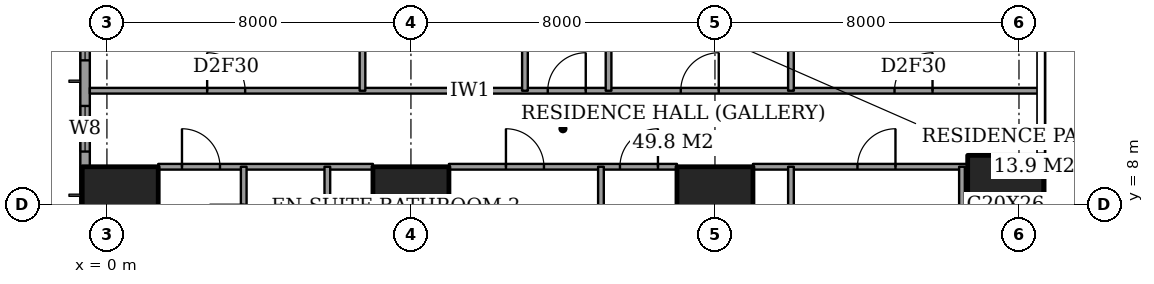
"""IFC4 building model, lengths in metres.
Left out: names, types, materials, properties, quantities, classifications, styles, units other than length and angle.
Written with IfcOpenShell. Run it as: python <this file> out.ifc"""

import sys

from ifc_helpers import new_model, si_unit, direction, frame, frame_2d, origin, origin_2d, place, context, subcontext, project, spatial, rectangle, extrude, element, fill, save


model = new_model("IFC4")
c1 = context("Model", 3, precision=1e-05, world=origin(), true_north=direction((0.0, 1.0)))
c2 = subcontext(c1, "Body", "Model", "MODEL_VIEW")
j1 = project(units=[si_unit("LENGTHUNIT", "METRE"), si_unit("PLANEANGLEUNIT", "RADIAN")], contexts=[c1])
p1 = place(None, origin())
s1 = spatial("IfcSite", under=j1, at=p1, CompositionType="ELEMENT")
p2 = place(p1, origin())
s2 = spatial("IfcBuilding", under=s1, at=p2, CompositionType="ELEMENT")
p3 = place(p2, frame((0.0, 0.0, 72.8)))
s3 = spatial("IfcBuildingStorey", under=s2, at=p3, CompositionType="ELEMENT", Elevation=72.8)
for number, where, z_axis, x_axis in (
    (1, (0.35, 8.0, 0.0), (0.0, 0.0, 1.0), (1.0, 0.0, 0.0)),
    (2, (8.0, 8.0, 0.0), (0.0, 0.0, 1.0), (1.0, 0.0, 0.0)),
    (3, (16.0, 8.0, 0.0), (0.0, 0.0, 1.0), (1.0, 0.0, 0.0)),
):
    element("IfcColumn", number, at=place(p3, frame(where, z_axis=z_axis, x_axis=x_axis)), inside=s3, PredefinedType="COLUMN", context=c2, shape_type="SweptSolid", body=[
        extrude(rectangle(XDim=2.0, YDim=2.0, at=origin_2d()), origin(), (0.0, 0.0, 1.0), 3.6),
    ])
p4 = place(p3, frame((23.65, 8.0, 0.0), z_axis=(0.0, 0.0, 1.0), x_axis=(1.0, 0.0, 0.0)))
e4 = element("IfcColumn", 4, at=p4, inside=s3, PredefinedType="COLUMN", context=c2, shape_type="SweptSolid", body=[
    extrude(rectangle(XDim=2.0, YDim=2.6, at=origin_2d()), origin(), (0.0, 0.0, 1.0), 3.6),
])
p5 = place(p3, frame((-0.575, 44.825, 0.0), z_axis=(0.0, 0.0, 1.0), x_axis=(0.0, -1.0, 0.0)))
e5 = element("IfcWall", 5, at=p5, inside=s3, PredefinedType="SOLIDWALL", context=c2, shape_type="SweptSolid", body=[
    extrude(rectangle(XDim=41.65, YDim=0.25, at=frame_2d((20.825, 0.0))), origin(), (0.0, 0.0, 1.0), 3.6),
])
p6 = place(p5, frame((0.775, 0.0, 0.6)))
e6 = element("IfcOpeningElement", 6, at=p6, cuts=e5, PredefinedType="OPENING", context=c2, shape_type="SweptSolid", body=[
    extrude(rectangle(XDim=2.4, YDim=2.0, at=frame_2d((1.2, 1.0))), frame((0.0, 0.135, 0.0), z_axis=(0.0, -1.0, 0.0), x_axis=(1.0, 0.0, 0.0)), (0.0, 0.0, 1.0), 0.27),
])
p7 = place(p5, frame((6.1, 0.0, 0.6)))
e7 = element("IfcOpeningElement", 7, at=p7, cuts=e5, PredefinedType="OPENING", context=c2, shape_type="SweptSolid", body=[
    extrude(rectangle(XDim=1.2, YDim=2.0, at=frame_2d((0.6, 1.0))), frame((0.0, 0.135, 0.0), z_axis=(0.0, -1.0, 0.0), x_axis=(1.0, 0.0, 0.0)), (0.0, 0.0, 1.0), 0.27),
])
p8 = place(p5, frame((8.425, 0.0, 0.6)))
e8 = element("IfcOpeningElement", 8, at=p8, cuts=e5, PredefinedType="OPENING", context=c2, shape_type="SweptSolid", body=[
    extrude(rectangle(XDim=2.4, YDim=2.0, at=frame_2d((1.2, 1.0))), frame((0.0, 0.135, 0.0), z_axis=(0.0, -1.0, 0.0), x_axis=(1.0, 0.0, 0.0)), (0.0, 0.0, 1.0), 0.27),
])
p9 = place(p5, frame((15.625, 0.0, 0.6)))
e9 = element("IfcOpeningElement", 9, at=p9, cuts=e5, PredefinedType="OPENING", context=c2, shape_type="SweptSolid", body=[
    extrude(rectangle(XDim=2.4, YDim=2.0, at=frame_2d((1.2, 1.0))), frame((0.0, 0.135, 0.0), z_axis=(0.0, -1.0, 0.0), x_axis=(1.0, 0.0, 0.0)), (0.0, 0.0, 1.0), 0.27),
])
p10 = place(p5, frame((23.625, 0.0, 0.6)))
e10 = element("IfcOpeningElement", 10, at=p10, cuts=e5, PredefinedType="OPENING", context=c2, shape_type="SweptSolid", body=[
    extrude(rectangle(XDim=2.4, YDim=2.0, at=frame_2d((1.2, 1.0))), frame((0.0, 0.135, 0.0), z_axis=(0.0, -1.0, 0.0), x_axis=(1.0, 0.0, 0.0)), (0.0, 0.0, 1.0), 0.27),
])
p11 = place(p5, frame((30.625, 0.0, 0.6)))
e11 = element("IfcOpeningElement", 11, at=p11, cuts=e5, PredefinedType="OPENING", context=c2, shape_type="SweptSolid", body=[
    extrude(rectangle(XDim=2.4, YDim=2.0, at=frame_2d((1.2, 1.0))), frame((0.0, 0.135, 0.0), z_axis=(0.0, -1.0, 0.0), x_axis=(1.0, 0.0, 0.0)), (0.0, 0.0, 1.0), 0.27),
])
p12 = place(p5, frame((34.225, 0.0, 0.6)))
e12 = element("IfcOpeningElement", 12, at=p12, cuts=e5, PredefinedType="OPENING", context=c2, shape_type="SweptSolid", body=[
    extrude(rectangle(XDim=1.2, YDim=2.0, at=frame_2d((0.6, 1.0))), frame((0.0, 0.135, 0.0), z_axis=(0.0, -1.0, 0.0), x_axis=(1.0, 0.0, 0.0)), (0.0, 0.0, 1.0), 0.27),
])
p13 = place(p5, frame((38.475, 0.0, 0.6)))
e13 = element("IfcOpeningElement", 13, at=p13, cuts=e5, PredefinedType="OPENING", context=c2, shape_type="SweptSolid", body=[
    extrude(rectangle(XDim=2.4, YDim=2.0, at=frame_2d((1.2, 1.0))), frame((0.0, 0.135, 0.0), z_axis=(0.0, -1.0, 0.0), x_axis=(1.0, 0.0, 0.0)), (0.0, 0.0, 1.0), 0.27),
])
p14 = place(p3, frame((1.35, 9.0, 0.0), z_axis=(0.0, 0.0, 1.0), x_axis=(1.0, 0.0, 0.0)))
e14 = element("IfcWall", 14, at=p14, inside=s3, PredefinedType="PARTITIONING", context=c2, shape_type="SweptSolid", body=[
    extrude(rectangle(XDim=5.65, YDim=0.15, at=frame_2d((2.825, 0.0))), origin(), (0.0, 0.0, 1.0), 3.35),
])
p15 = place(p14, frame((0.625, 0.0, 0.0)))
e15 = element("IfcOpeningElement", 15, at=p15, cuts=e14, PredefinedType="OPENING", context=c2, shape_type="SweptSolid", body=[
    extrude(rectangle(XDim=1.0, YDim=2.1, at=frame_2d((0.5, 1.05))), frame((0.0, 0.085, 0.0), z_axis=(0.0, -1.0, 0.0), x_axis=(1.0, 0.0, 0.0)), (0.0, 0.0, 1.0), 0.17),
])
p16 = place(p3, frame((9.0, 9.0, 0.0), z_axis=(0.0, 0.0, 1.0), x_axis=(1.0, 0.0, 0.0)))
e16 = element("IfcWall", 16, at=p16, inside=s3, PredefinedType="PARTITIONING", context=c2, shape_type="SweptSolid", body=[
    extrude(rectangle(XDim=6.0, YDim=0.15, at=frame_2d((3.0, 0.0))), origin(), (0.0, 0.0, 1.0), 3.35),
])
p17 = place(p16, frame((1.5, 0.0, 0.0)))
e17 = element("IfcOpeningElement", 17, at=p17, cuts=e16, PredefinedType="OPENING", context=c2, shape_type="SweptSolid", body=[
    extrude(rectangle(XDim=1.0, YDim=2.1, at=frame_2d((0.5, 1.05))), frame((0.0, 0.085, 0.0), z_axis=(0.0, -1.0, 0.0), x_axis=(1.0, 0.0, 0.0)), (0.0, 0.0, 1.0), 0.17),
])
p18 = place(p16, frame((4.5, 0.0, 0.0)))
e18 = element("IfcOpeningElement", 18, at=p18, cuts=e16, PredefinedType="OPENING", context=c2, shape_type="SweptSolid", body=[
    extrude(rectangle(XDim=1.0, YDim=2.1, at=frame_2d((0.5, 1.05))), frame((0.0, 0.085, 0.0), z_axis=(0.0, -1.0, 0.0), x_axis=(1.0, 0.0, 0.0)), (0.0, 0.0, 1.0), 0.17),
])
p19 = place(p3, frame((17.0, 9.0, 0.0), z_axis=(0.0, 0.0, 1.0), x_axis=(1.0, 0.0, 0.0)))
e19 = element("IfcWall", 19, at=p19, inside=s3, PredefinedType="PARTITIONING", context=c2, shape_type="SweptSolid", body=[
    extrude(rectangle(XDim=5.65, YDim=0.15, at=frame_2d((2.825, 0.0))), origin(), (0.0, 0.0, 1.0), 3.35),
])
p20 = place(p19, frame((2.75, 0.0, 0.0)))
e20 = element("IfcOpeningElement", 20, at=p20, cuts=e19, PredefinedType="OPENING", context=c2, shape_type="SweptSolid", body=[
    extrude(rectangle(XDim=1.0, YDim=2.1, at=frame_2d((0.5, 1.05))), frame((0.0, 0.085, 0.0), z_axis=(0.0, -1.0, 0.0), x_axis=(1.0, 0.0, 0.0)), (0.0, 0.0, 1.0), 0.17),
])
p21 = place(p3, frame((-0.45, 11.0, 0.0), z_axis=(0.0, 0.0, 1.0), x_axis=(1.0, 0.0, 0.0)))
e21 = element("IfcWall", 21, at=p21, inside=s3, PredefinedType="PARTITIONING", context=c2, shape_type="SweptSolid", body=[
    extrude(rectangle(XDim=25.011, YDim=0.15, at=frame_2d((12.505, 0.0))), origin(), (0.0, 0.0, 1.0), 3.35),
])
p22 = place(p21, frame((12.05, 0.0, 0.0)))
e22 = element("IfcOpeningElement", 22, at=p22, cuts=e21, PredefinedType="OPENING", context=c2, shape_type="SweptSolid", body=[
    extrude(rectangle(XDim=1.0, YDim=2.1, at=frame_2d((0.5, 1.05))), frame((0.0, 0.085, 0.0), z_axis=(0.0, -1.0, 0.0), x_axis=(1.0, 0.0, 0.0)), (0.0, 0.0, 1.0), 0.17),
])
p23 = place(p21, frame((3.087, 0.0, 0.0)))
e23 = element("IfcOpeningElement", 23, at=p23, cuts=e21, PredefinedType="OPENING", context=c2, shape_type="SweptSolid", body=[
    extrude(rectangle(XDim=1.0, YDim=2.1, at=frame_2d((0.5, 1.05))), frame((0.0, 0.085, 0.0), z_axis=(0.0, -1.0, 0.0), x_axis=(1.0, 0.0, 0.0)), (0.0, 0.0, 1.0), 0.17),
])
p24 = place(p21, frame((15.55, 0.0, 0.0)))
e24 = element("IfcOpeningElement", 24, at=p24, cuts=e21, PredefinedType="OPENING", context=c2, shape_type="SweptSolid", body=[
    extrude(rectangle(XDim=1.0, YDim=2.1, at=frame_2d((0.5, 1.05))), frame((0.0, 0.085, 0.0), z_axis=(0.0, -1.0, 0.0), x_axis=(1.0, 0.0, 0.0)), (0.0, 0.0, 1.0), 0.17),
])
p25 = place(p21, frame((21.175, 0.0, 0.0)))
e25 = element("IfcOpeningElement", 25, at=p25, cuts=e21, PredefinedType="OPENING", context=c2, shape_type="SweptSolid", body=[
    extrude(rectangle(XDim=1.0, YDim=2.1, at=frame_2d((0.5, 1.05))), frame((0.0, 0.085, 0.0), z_axis=(0.0, -1.0, 0.0), x_axis=(1.0, 0.0, 0.0)), (0.0, 0.0, 1.0), 0.17),
])
p26 = place(p3, frame((3.6, 6.1, 0.0), z_axis=(0.0, 0.0, 1.0), x_axis=(0.0, 1.0, 0.0)))
e26 = element("IfcWall", 26, at=p26, inside=s3, PredefinedType="PARTITIONING", context=c2, shape_type="SweptSolid", body=[
    extrude(rectangle(XDim=2.9, YDim=0.15, at=frame_2d((1.45, 0.0))), origin(), (0.0, 0.0, 1.0), 3.35),
])
p27 = place(p26, frame((1.0, 0.0, 0.0)))
e27 = element("IfcOpeningElement", 27, at=p27, cuts=e26, PredefinedType="OPENING", context=c2, shape_type="SweptSolid", body=[
    extrude(rectangle(XDim=0.9, YDim=2.1, at=frame_2d((0.45, 1.05))), frame((0.0, 0.085, 0.0), z_axis=(0.0, -1.0, 0.0), x_axis=(1.0, 0.0, 0.0)), (0.0, 0.0, 1.0), 0.17),
])
p28 = place(p3, frame((5.8, -0.45, 0.0), z_axis=(0.0, 0.0, 1.0), x_axis=(0.0, 1.0, 0.0)))
e28 = element("IfcWall", 28, at=p28, inside=s3, PredefinedType="PARTITIONING", context=c2, shape_type="SweptSolid", body=[
    extrude(rectangle(XDim=9.45, YDim=0.15, at=frame_2d((4.725, 0.0))), origin(), (0.0, 0.0, 1.0), 3.35),
])
p29 = place(p3, frame((6.725, 11.0, 0.0), z_axis=(0.0, 0.0, 1.0), x_axis=(0.0, 1.0, 0.0)))
e29 = element("IfcWall", 29, at=p29, inside=s3, PredefinedType="PARTITIONING", context=c2, shape_type="SweptSolid", body=[
    extrude(rectangle(XDim=3.8, YDim=0.15, at=frame_2d((1.9, 0.0))), origin(), (0.0, 0.0, 1.0), 3.35),
])
p30 = place(p29, frame((1.15, 0.0, 0.0)))
e30 = element("IfcOpeningElement", 30, at=p30, cuts=e29, PredefinedType="OPENING", context=c2, shape_type="SweptSolid", body=[
    extrude(rectangle(XDim=0.9, YDim=2.1, at=frame_2d((0.45, 1.05))), frame((0.0, 0.085, 0.0), z_axis=(0.0, -1.0, 0.0), x_axis=(1.0, 0.0, 0.0)), (0.0, 0.0, 1.0), 0.17),
])
p31 = place(p3, frame((11.0, 11.0, 0.0), z_axis=(0.0, 0.0, 1.0), x_axis=(0.0, 1.0, 0.0)))
e31 = element("IfcWall", 31, at=p31, inside=s3, PredefinedType="PARTITIONING", context=c2, shape_type="SweptSolid", body=[
    extrude(rectangle(XDim=10.6, YDim=0.15, at=frame_2d((5.3, 0.0))), origin(), (0.0, 0.0, 1.0), 3.35),
])
p32 = place(p31, frame((7.962, 0.0, 0.0)))
e32 = element("IfcOpeningElement", 32, at=p32, cuts=e31, PredefinedType="OPENING", context=c2, shape_type="SweptSolid", body=[
    extrude(rectangle(XDim=1.0, YDim=2.1, at=frame_2d((0.5, 1.05))), frame((0.0, 0.085, 0.0), z_axis=(0.0, -1.0, 0.0), x_axis=(1.0, 0.0, 0.0)), (0.0, 0.0, 1.0), 0.17),
])
p33 = place(p3, frame((13.0, -0.45, 0.0), z_axis=(0.0, 0.0, 1.0), x_axis=(0.0, 1.0, 0.0)))
e33 = element("IfcWall", 33, at=p33, inside=s3, PredefinedType="PARTITIONING", context=c2, shape_type="SweptSolid", body=[
    extrude(rectangle(XDim=9.45, YDim=0.15, at=frame_2d((4.725, 0.0))), origin(), (0.0, 0.0, 1.0), 3.35),
])
p34 = place(p3, frame((13.2, 11.0, 0.0), z_axis=(0.0, 0.0, 1.0), x_axis=(0.0, 1.0, 0.0)))
e34 = element("IfcWall", 34, at=p34, inside=s3, PredefinedType="PARTITIONING", context=c2, shape_type="SweptSolid", body=[
    extrude(rectangle(XDim=6.325, YDim=0.15, at=frame_2d((3.163, 0.0))), origin(), (0.0, 0.0, 1.0), 3.35),
])
p35 = place(p3, frame((18.0, -0.45, 0.0), z_axis=(0.0, 0.0, 1.0), x_axis=(0.0, 1.0, 0.0)))
e35 = element("IfcWall", 35, at=p35, inside=s3, PredefinedType="PARTITIONING", context=c2, shape_type="SweptSolid", body=[
    extrude(rectangle(XDim=9.45, YDim=0.15, at=frame_2d((4.725, 0.0))), origin(), (0.0, 0.0, 1.0), 3.35),
])
p36 = place(p3, frame((18.0, 11.0, 0.0), z_axis=(0.0, 0.0, 1.0), x_axis=(0.0, 1.0, 0.0)))
e36 = element("IfcWall", 36, at=p36, inside=s3, PredefinedType="PARTITIONING", context=c2, shape_type="SweptSolid", body=[
    extrude(rectangle(XDim=6.325, YDim=0.15, at=frame_2d((3.163, 0.0))), origin(), (0.0, 0.0, 1.0), 3.35),
])
p37 = place(p3, frame((22.5, -0.45, 0.0), z_axis=(0.0, 0.0, 1.0), x_axis=(0.0, 1.0, 0.0)))
e37 = element("IfcWall", 37, at=p37, inside=s3, PredefinedType="PARTITIONING", context=c2, shape_type="SweptSolid", body=[
    extrude(rectangle(XDim=9.45, YDim=0.15, at=frame_2d((4.725, 0.0))), origin(), (0.0, 0.0, 1.0), 3.35),
])
p38 = place(p37, frame((4.275, 0.0, 0.0)))
e38 = element("IfcOpeningElement", 38, at=p38, cuts=e37, PredefinedType="OPENING", context=c2, shape_type="SweptSolid", body=[
    extrude(rectangle(XDim=0.9, YDim=2.1, at=frame_2d((0.45, 1.05))), frame((0.0, 0.085, 0.0), z_axis=(0.0, -1.0, 0.0), x_axis=(1.0, 0.0, 0.0)), (0.0, 0.0, 1.0), 0.17),
])
p39 = place(p11, origin())
e39 = element("IfcWindow", 39, at=p39, inside=s3, PartitioningType="SINGLE_PANEL", PredefinedType="WINDOW", context=c2, shape_type="SweptSolid", body=[
    extrude(rectangle(XDim=2.4, YDim=2.0, at=frame_2d((1.2, 1.0))), frame((0.0, 0.03, 0.0), z_axis=(0.0, -1.0, 0.0), x_axis=(1.0, 0.0, 0.0)), (0.0, 0.0, 1.0), 0.06),
])
fill(e11, e39)
p40 = place(p12, origin())
e40 = element("IfcWindow", 40, at=p40, inside=s3, PartitioningType="SINGLE_PANEL", PredefinedType="WINDOW", context=c2, shape_type="SweptSolid", body=[
    extrude(rectangle(XDim=1.2, YDim=2.0, at=frame_2d((0.6, 1.0))), frame((0.0, 0.03, 0.0), z_axis=(0.0, -1.0, 0.0), x_axis=(1.0, 0.0, 0.0)), (0.0, 0.0, 1.0), 0.06),
])
fill(e12, e40)
p41 = place(p15, origin())
e41 = element("IfcDoor", 41, at=p41, inside=s3, OperationType="SINGLE_SWING_RIGHT", PredefinedType="DOOR", context=c2, shape_type="SweptSolid", body=[
    extrude(rectangle(XDim=1.0, YDim=2.1, at=frame_2d((0.5, 1.05))), frame((0.0, 0.025, 0.0), z_axis=(0.0, -1.0, 0.0), x_axis=(1.0, 0.0, 0.0)), (0.0, 0.0, 1.0), 0.05),
])
fill(e15, e41)
p42 = place(p17, origin())
e42 = element("IfcDoor", 42, at=p42, inside=s3, OperationType="SINGLE_SWING_RIGHT", PredefinedType="DOOR", context=c2, shape_type="SweptSolid", body=[
    extrude(rectangle(XDim=1.0, YDim=2.1, at=frame_2d((0.5, 1.05))), frame((0.0, 0.025, 0.0), z_axis=(0.0, -1.0, 0.0), x_axis=(1.0, 0.0, 0.0)), (0.0, 0.0, 1.0), 0.05),
])
fill(e17, e42)
p43 = place(p18, origin())
e43 = element("IfcDoor", 43, at=p43, inside=s3, OperationType="SINGLE_SWING_LEFT", PredefinedType="DOOR", context=c2, shape_type="SweptSolid", body=[
    extrude(rectangle(XDim=1.0, YDim=2.1, at=frame_2d((0.5, 1.05))), frame((0.0, 0.025, 0.0), z_axis=(0.0, -1.0, 0.0), x_axis=(1.0, 0.0, 0.0)), (0.0, 0.0, 1.0), 0.05),
])
fill(e18, e43)
p44 = place(p20, origin())
e44 = element("IfcDoor", 44, at=p44, inside=s3, OperationType="SINGLE_SWING_LEFT", PredefinedType="DOOR", context=c2, shape_type="SweptSolid", body=[
    extrude(rectangle(XDim=1.0, YDim=2.1, at=frame_2d((0.5, 1.05))), frame((0.0, 0.025, 0.0), z_axis=(0.0, -1.0, 0.0), x_axis=(1.0, 0.0, 0.0)), (0.0, 0.0, 1.0), 0.05),
])
fill(e20, e44)
p45 = place(p22, origin())
e45 = element("IfcDoor", 45, at=p45, inside=s3, OperationType="SINGLE_SWING_LEFT", PredefinedType="DOOR", context=c2, shape_type="SweptSolid", body=[
    extrude(rectangle(XDim=1.0, YDim=2.1, at=frame_2d((0.5, 1.05))), frame((0.0, 0.025, 0.0), z_axis=(0.0, -1.0, 0.0), x_axis=(1.0, 0.0, 0.0)), (0.0, 0.0, 1.0), 0.05),
])
fill(e22, e45)
p46 = place(p23, origin())
e46 = element("IfcDoor", 46, at=p46, inside=s3, OperationType="SINGLE_SWING_RIGHT", PredefinedType="DOOR", context=c2, shape_type="SweptSolid", body=[
    extrude(rectangle(XDim=1.0, YDim=2.1, at=frame_2d((0.5, 1.05))), frame((0.0, 0.025, 0.0), z_axis=(0.0, -1.0, 0.0), x_axis=(1.0, 0.0, 0.0)), (0.0, 0.0, 1.0), 0.05),
])
fill(e23, e46)
p47 = place(p24, origin())
e47 = element("IfcDoor", 47, at=p47, inside=s3, OperationType="SINGLE_SWING_LEFT", PredefinedType="DOOR", context=c2, shape_type="SweptSolid", body=[
    extrude(rectangle(XDim=1.0, YDim=2.1, at=frame_2d((0.5, 1.05))), frame((0.0, 0.025, 0.0), z_axis=(0.0, -1.0, 0.0), x_axis=(1.0, 0.0, 0.0)), (0.0, 0.0, 1.0), 0.05),
])
fill(e24, e47)
p48 = place(p25, origin())
e48 = element("IfcDoor", 48, at=p48, inside=s3, OperationType="SINGLE_SWING_LEFT", PredefinedType="DOOR", context=c2, shape_type="SweptSolid", body=[
    extrude(rectangle(XDim=1.0, YDim=2.1, at=frame_2d((0.5, 1.05))), frame((0.0, 0.025, 0.0), z_axis=(0.0, -1.0, 0.0), x_axis=(1.0, 0.0, 0.0)), (0.0, 0.0, 1.0), 0.05),
])
fill(e25, e48)
save(model, sys.argv[1])
